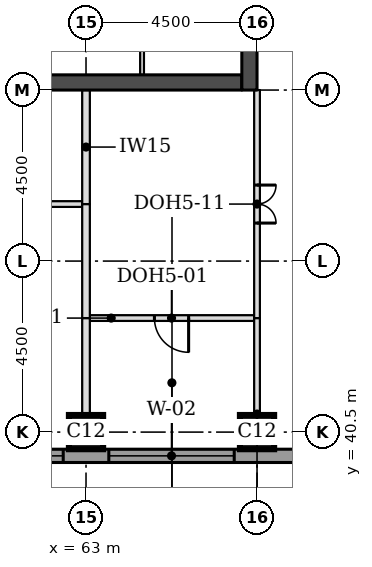
"""IFC4 building model, lengths in metres.
Left out: names, types, materials, properties, quantities, classifications, styles, units other than length and angle.
Written with IfcOpenShell. Run it as: python <this file> out.ifc"""

import sys

from ifc_helpers import new_model, si_unit, direction, frame, frame_2d, origin, origin_2d, place, context, subcontext, project, spatial, rectangle, extrude, element, fill, save


model = new_model("IFC4")
c1 = context("Model", 3, precision=1e-05, world=origin(), true_north=direction((0.0, 1.0)))
c2 = subcontext(c1, "Body", "Model", "MODEL_VIEW")
j1 = project(units=[si_unit("LENGTHUNIT", "METRE"), si_unit("PLANEANGLEUNIT", "RADIAN")], contexts=[c1])
p1 = place(None, origin())
s1 = spatial("IfcSite", under=j1, at=p1, CompositionType="ELEMENT")
p2 = place(p1, origin())
s2 = spatial("IfcBuilding", under=s1, at=p2, CompositionType="ELEMENT")
p3 = place(p2, frame((0.0, 0.0, 181.0)))
s3 = spatial("IfcBuildingStorey", under=s2, at=p3, CompositionType="ELEMENT", Elevation=181.0)
for number, where, z_axis, x_axis in (
    (1, (63.0, 40.5, 0.0), (0.0, 0.0, 1.0), (1.0, 0.0, 0.0)),
    (2, (67.5, 40.5, 0.0), (0.0, 0.0, 1.0), (1.0, 0.0, 0.0)),
):
    element("IfcColumn", number, at=place(p3, frame(where, z_axis=z_axis, x_axis=x_axis)), inside=s3, PredefinedType="COLUMN", context=c2, shape_type="SweptSolid", body=[
        extrude(rectangle(XDim=0.9, YDim=0.9, at=origin_2d()), origin(), (0.0, 0.0, 1.0), 3.7),
    ])
p4 = place(p3, frame((45.4, 49.7, 0.0), z_axis=(0.0, 0.0, 1.0), x_axis=(1.0, 0.0, 0.0)))
e3 = element("IfcWall", 3, at=p4, inside=s3, PredefinedType="SHEAR", context=c2, shape_type="SweptSolid", body=[
    extrude(rectangle(XDim=21.7, YDim=0.4, at=frame_2d((10.85, 0.0))), origin(), (0.0, 0.0, 1.0), 3.7),
])
p5 = place(p3, frame((67.3, 49.5, 0.0), z_axis=(0.0, 0.0, 1.0), x_axis=(0.0, 1.0, 0.0)))
e4 = element("IfcWall", 4, at=p5, inside=s3, PredefinedType="SHEAR", context=c2, shape_type="SweptSolid", body=[
    extrude(rectangle(XDim=22.5, YDim=0.4, at=frame_2d((11.25, 0.0))), origin(), (0.0, 0.0, 1.0), 3.7),
])
p6 = place(p5, frame((4.2, 0.0, 0.0)))
e5 = element("IfcOpeningElement", 5, at=p6, cuts=e4, PredefinedType="OPENING", context=c2, shape_type="SweptSolid", body=[
    extrude(rectangle(XDim=1.8, YDim=2.1, at=frame_2d((0.9, 1.05))), frame((0.0, 0.21, 0.0), z_axis=(0.0, -1.0, 0.0), x_axis=(1.0, 0.0, 0.0)), (0.0, 0.0, 1.0), 0.42),
])
p7 = place(p5, frame((6.9, 0.0, 0.0)))
e6 = element("IfcOpeningElement", 6, at=p7, cuts=e4, PredefinedType="OPENING", context=c2, shape_type="SweptSolid", body=[
    extrude(rectangle(XDim=1.1, YDim=2.1, at=frame_2d((0.55, 1.05))), frame((0.0, 0.21, 0.0), z_axis=(0.0, -1.0, 0.0), x_axis=(1.0, 0.0, 0.0)), (0.0, 0.0, 1.0), 0.42),
])
p8 = place(p5, frame((13.6, 0.0, 0.0)))
e7 = element("IfcOpeningElement", 7, at=p8, cuts=e4, PredefinedType="OPENING", context=c2, shape_type="SweptSolid", body=[
    extrude(rectangle(XDim=1.1, YDim=2.1, at=frame_2d((0.55, 1.05))), frame((0.0, 0.21, 0.0), z_axis=(0.0, -1.0, 0.0), x_axis=(1.0, 0.0, 0.0)), (0.0, 0.0, 1.0), 0.42),
])
p9 = place(p5, frame((16.5, 0.0, 0.0)))
e8 = element("IfcOpeningElement", 8, at=p9, cuts=e4, PredefinedType="OPENING", context=c2, shape_type="SweptSolid", body=[
    extrude(rectangle(XDim=1.8, YDim=2.1, at=frame_2d((0.9, 1.05))), frame((0.0, 0.21, 0.0), z_axis=(0.0, -1.0, 0.0), x_axis=(1.0, 0.0, 0.0)), (0.0, 0.0, 1.0), 0.42),
])
p10 = place(p3, frame((36.0, 39.875, 0.0), z_axis=(0.0, 0.0, 1.0), x_axis=(1.0, 0.0, 0.0)))
e9 = element("IfcWall", 9, at=p10, inside=s3, PredefinedType="STANDARD", context=c2, shape_type="SweptSolid", body=[
    extrude(rectangle(XDim=36.331, YDim=0.35, at=frame_2d((18.166, 0.0))), origin(), (0.0, 0.0, 1.0), 3.525),
])
p11 = place(p10, frame((5.1, 0.0, 0.9)))
e10 = element("IfcOpeningElement", 10, at=p11, cuts=e9, PredefinedType="OPENING", context=c2, shape_type="SweptSolid", body=[
    extrude(rectangle(XDim=3.3, YDim=1.9, at=frame_2d((1.65, 0.95))), frame((0.0, 0.185, 0.0), z_axis=(0.0, -1.0, 0.0), x_axis=(1.0, 0.0, 0.0)), (0.0, 0.0, 1.0), 0.37),
])
p12 = place(p10, frame((9.6, 0.0, 0.9)))
e11 = element("IfcOpeningElement", 11, at=p12, cuts=e9, PredefinedType="OPENING", context=c2, shape_type="SweptSolid", body=[
    extrude(rectangle(XDim=3.3, YDim=1.9, at=frame_2d((1.65, 0.95))), frame((0.0, 0.185, 0.0), z_axis=(0.0, -1.0, 0.0), x_axis=(1.0, 0.0, 0.0)), (0.0, 0.0, 1.0), 0.37),
])
p13 = place(p10, frame((14.1, 0.0, 0.9)))
e12 = element("IfcOpeningElement", 12, at=p13, cuts=e9, PredefinedType="OPENING", context=c2, shape_type="SweptSolid", body=[
    extrude(rectangle(XDim=3.3, YDim=1.9, at=frame_2d((1.65, 0.95))), frame((0.0, 0.185, 0.0), z_axis=(0.0, -1.0, 0.0), x_axis=(1.0, 0.0, 0.0)), (0.0, 0.0, 1.0), 0.37),
])
p14 = place(p10, frame((18.6, 0.0, 0.9)))
e13 = element("IfcOpeningElement", 13, at=p14, cuts=e9, PredefinedType="OPENING", context=c2, shape_type="SweptSolid", body=[
    extrude(rectangle(XDim=3.3, YDim=1.9, at=frame_2d((1.65, 0.95))), frame((0.0, 0.185, 0.0), z_axis=(0.0, -1.0, 0.0), x_axis=(1.0, 0.0, 0.0)), (0.0, 0.0, 1.0), 0.37),
])
p15 = place(p10, frame((23.1, 0.0, 0.9)))
e14 = element("IfcOpeningElement", 14, at=p15, cuts=e9, PredefinedType="OPENING", context=c2, shape_type="SweptSolid", body=[
    extrude(rectangle(XDim=3.3, YDim=1.9, at=frame_2d((1.65, 0.95))), frame((0.0, 0.185, 0.0), z_axis=(0.0, -1.0, 0.0), x_axis=(1.0, 0.0, 0.0)), (0.0, 0.0, 1.0), 0.37),
])
p16 = place(p10, frame((27.6, 0.0, 0.9)))
e15 = element("IfcOpeningElement", 15, at=p16, cuts=e9, PredefinedType="OPENING", context=c2, shape_type="SweptSolid", body=[
    extrude(rectangle(XDim=3.3, YDim=1.9, at=frame_2d((1.65, 0.95))), frame((0.0, 0.185, 0.0), z_axis=(0.0, -1.0, 0.0), x_axis=(1.0, 0.0, 0.0)), (0.0, 0.0, 1.0), 0.37),
])
p17 = place(p3, frame((63.1, 43.5, 0.0), z_axis=(0.0, 0.0, 1.0), x_axis=(1.0, 0.0, 0.0)))
e16 = element("IfcWall", 16, at=p17, inside=s3, PredefinedType="PARTITIONING", context=c2, shape_type="SweptSolid", body=[
    extrude(rectangle(XDim=4.325, YDim=0.15, at=frame_2d((2.163, 0.0))), origin(), (0.0, 0.0, 1.0), 3.55),
])
p18 = place(p17, frame((1.7, 0.0, 0.0)))
e17 = element("IfcOpeningElement", 17, at=p18, cuts=e16, PredefinedType="OPENING", context=c2, shape_type="SweptSolid", body=[
    extrude(rectangle(XDim=0.9, YDim=2.1, at=frame_2d((0.45, 1.05))), frame((0.0, 0.085, 0.0), z_axis=(0.0, -1.0, 0.0), x_axis=(1.0, 0.0, 0.0)), (0.0, 0.0, 1.0), 0.17),
])
p19 = place(p3, frame((54.0, 46.5, 0.0), z_axis=(0.0, 0.0, 1.0), x_axis=(1.0, 0.0, 0.0)))
e18 = element("IfcWall", 18, at=p19, inside=s3, PredefinedType="PARTITIONING", context=c2, shape_type="SweptSolid", body=[
    extrude(rectangle(XDim=8.9, YDim=0.15, at=frame_2d((4.45, 0.0))), origin(), (0.0, 0.0, 1.0), 3.55),
])
p20 = place(p19, frame((4.0, 0.0, 0.0)))
e19 = element("IfcOpeningElement", 19, at=p20, cuts=e18, PredefinedType="OPENING", context=c2, shape_type="SweptSolid", body=[
    extrude(rectangle(XDim=0.9, YDim=2.1, at=frame_2d((0.45, 1.05))), frame((0.0, 0.085, 0.0), z_axis=(0.0, -1.0, 0.0), x_axis=(1.0, 0.0, 0.0)), (0.0, 0.0, 1.0), 0.17),
])
p21 = place(p3, frame((63.0, 40.05, 0.0), z_axis=(0.0, 0.0, 1.0), x_axis=(0.0, 1.0, 0.0)))
e20 = element("IfcWall", 20, at=p21, inside=s3, PredefinedType="PARTITIONING", context=c2, shape_type="SweptSolid", body=[
    extrude(rectangle(XDim=3.45, YDim=0.2, at=frame_2d((1.725, 0.0))), origin(), (0.0, 0.0, 1.0), 3.55),
])
p22 = place(p3, frame((67.5, 40.05, 0.0), z_axis=(0.0, 0.0, 1.0), x_axis=(0.0, 1.0, 0.0)))
e21 = element("IfcWall", 21, at=p22, inside=s3, PredefinedType="PARTITIONING", context=c2, shape_type="SweptSolid", body=[
    extrude(rectangle(XDim=3.45, YDim=0.15, at=frame_2d((1.725, 0.0))), origin(), (0.0, 0.0, 1.0), 3.022),
])
p23 = place(p3, frame((63.0, 43.5, 0.0), z_axis=(0.0, 0.0, 1.0), x_axis=(0.0, 1.0, 0.0)))
e22 = element("IfcWall", 22, at=p23, inside=s3, PredefinedType="PARTITIONING", context=c2, shape_type="SweptSolid", body=[
    extrude(rectangle(XDim=3.0, YDim=0.2, at=frame_2d((1.5, 0.0))), origin(), (0.0, 0.0, 1.0), 3.55),
])
p24 = place(p3, frame((67.5, 43.5, 0.0), z_axis=(0.0, 0.0, 1.0), x_axis=(0.0, 1.0, 0.0)))
e23 = element("IfcWall", 23, at=p24, inside=s3, PredefinedType="PARTITIONING", context=c2, shape_type="SweptSolid", body=[
    extrude(rectangle(XDim=6.0, YDim=0.15, at=frame_2d((3.0, 0.0))), origin(), (0.0, 0.0, 1.0), 3.022),
])
p25 = place(p24, frame((2.5, 0.0, 0.0)))
e24 = element("IfcOpeningElement", 24, at=p25, cuts=e23, PredefinedType="OPENING", context=c2, shape_type="SweptSolid", body=[
    extrude(rectangle(XDim=1.0, YDim=2.1, at=frame_2d((0.5, 1.05))), frame((0.0, 0.085, 0.0), z_axis=(0.0, -1.0, 0.0), x_axis=(1.0, 0.0, 0.0)), (0.0, 0.0, 1.0), 0.17),
])
p26 = place(p3, frame((63.0, 46.5, 0.0), z_axis=(0.0, 0.0, 1.0), x_axis=(0.0, 1.0, 0.0)))
e25 = element("IfcWall", 25, at=p26, inside=s3, PredefinedType="PARTITIONING", context=c2, shape_type="SweptSolid", body=[
    extrude(rectangle(XDim=3.0, YDim=0.2, at=frame_2d((1.5, 0.0))), origin(), (0.0, 0.0, 1.0), 3.55),
])
p27 = place(p3, frame((64.475, 49.9, 0.0), z_axis=(0.0, 0.0, 1.0), x_axis=(0.0, 1.0, 0.0)))
e26 = element("IfcWall", 26, at=p27, inside=s3, PredefinedType="PARTITIONING", context=c2, shape_type="SweptSolid", body=[
    extrude(rectangle(XDim=3.1, YDim=0.1, at=frame_2d((1.55, 0.0))), origin(), (0.0, 0.0, 1.0), 3.55),
])
p28 = place(p15, origin())
e27 = element("IfcWindow", 27, at=p28, inside=s3, PartitioningType="SINGLE_PANEL", PredefinedType="WINDOW", context=c2, shape_type="SweptSolid", body=[
    extrude(rectangle(XDim=3.3, YDim=1.9, at=frame_2d((1.65, 0.95))), frame((0.0, 0.085, 0.0), z_axis=(0.0, -1.0, 0.0), x_axis=(1.0, 0.0, 0.0)), (0.0, 0.0, 1.0), 0.06),
])
fill(e14, e27)
p29 = place(p16, origin())
e28 = element("IfcWindow", 28, at=p29, inside=s3, PartitioningType="SINGLE_PANEL", PredefinedType="WINDOW", context=c2, shape_type="SweptSolid", body=[
    extrude(rectangle(XDim=3.3, YDim=1.9, at=frame_2d((1.65, 0.95))), frame((0.0, 0.085, 0.0), z_axis=(0.0, -1.0, 0.0), x_axis=(1.0, 0.0, 0.0)), (0.0, 0.0, 1.0), 0.06),
])
fill(e15, e28)
p30 = place(p25, frame((1.0, 0.0, 0.0), z_axis=(0.0, 0.0, 1.0), x_axis=(-1.0, 0.0, 0.0)))
e29 = element("IfcDoor", 29, at=p30, inside=s3, OperationType="DOUBLE_DOOR_SINGLE_SWING", PredefinedType="DOOR", context=c2, shape_type="SweptSolid", body=[
    extrude(rectangle(XDim=1.0, YDim=2.1, at=frame_2d((0.5, 1.05))), frame((0.0, 0.025, 0.0), z_axis=(0.0, -1.0, 0.0), x_axis=(1.0, 0.0, 0.0)), (0.0, 0.0, 1.0), 0.05),
])
fill(e24, e29)
p31 = place(p18, frame((0.9, 0.0, 0.0), z_axis=(0.0, 0.0, 1.0), x_axis=(-1.0, 0.0, 0.0)))
e30 = element("IfcDoor", 30, at=p31, inside=s3, OperationType="SINGLE_SWING_LEFT", PredefinedType="DOOR", context=c2, shape_type="SweptSolid", body=[
    extrude(rectangle(XDim=0.9, YDim=2.1, at=frame_2d((0.45, 1.05))), frame((0.0, 0.025, 0.0), z_axis=(0.0, -1.0, 0.0), x_axis=(1.0, 0.0, 0.0)), (0.0, 0.0, 1.0), 0.05),
])
fill(e17, e30)
save(model, sys.argv[1])
